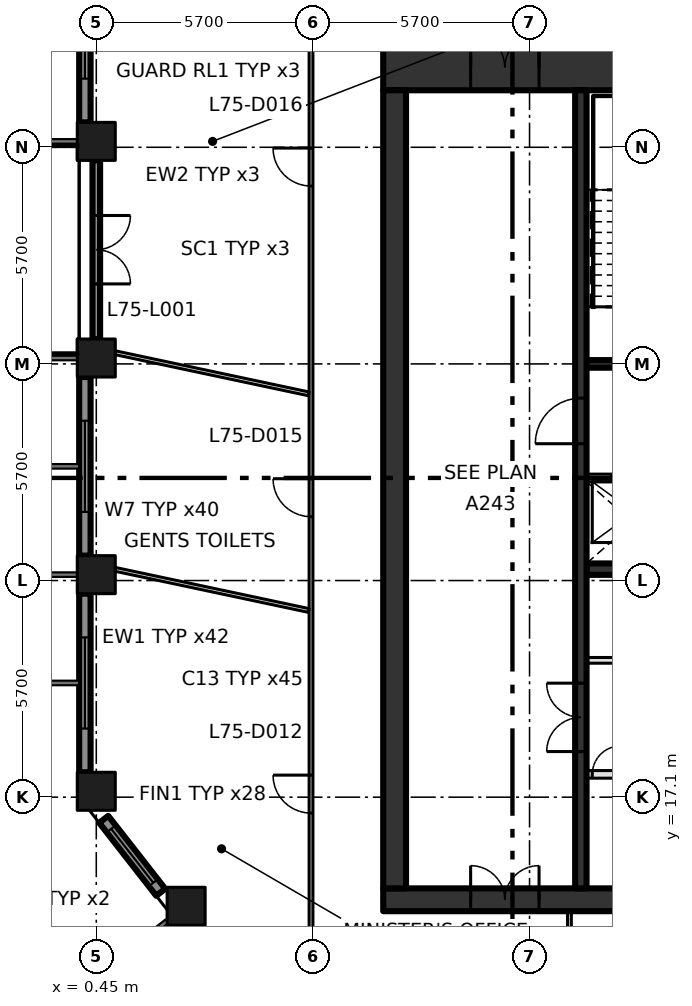
"""IFC4 building model, lengths in metres.
Left out: names, types, materials, properties, quantities, classifications, styles, units other than length and angle.
Written with IfcOpenShell. Run it as: python <this file> out.ifc"""

import sys

from ifc_helpers import new_model, si_unit, direction, frame, frame_2d, origin, origin_2d, place, context, subcontext, project, spatial, rectangle, extrude, element, fill, save


model = new_model("IFC4")
c1 = context("Model", 3, precision=1e-05, world=origin(), true_north=direction((0.0, 1.0)))
c2 = subcontext(c1, "Body", "Model", "MODEL_VIEW")
j1 = project(units=[si_unit("LENGTHUNIT", "METRE"), si_unit("PLANEANGLEUNIT", "RADIAN")], contexts=[c1])
p1 = place(None, origin())
s1 = spatial("IfcSite", under=j1, at=p1, CompositionType="ELEMENT")
p2 = place(p1, origin())
s2 = spatial("IfcBuilding", under=s1, at=p2, CompositionType="ELEMENT")
p3 = place(p2, frame((0.0, 0.0, 327.6)))
s3 = spatial("IfcBuildingStorey", under=s2, at=p3, CompositionType="ELEMENT", Elevation=327.6)
for number, where, z_axis, x_axis in (
    (1, (0.45, 17.255, 0.0), (0.0, 0.0, 1.0), (1.0, 0.0, 0.0)),
    (2, (0.45, 22.955, 0.0), (0.0, 0.0, 1.0), (1.0, 0.0, 0.0)),
    (3, (0.45, 28.655, 0.0), (0.0, 0.0, 1.0), (1.0, 0.0, 0.0)),
    (4, (0.45, 34.355, 0.0), (0.0, 0.0, 1.0), (1.0, 0.0, 0.0)),
    (5, (2.814, 14.229, 0.0), (0.0, 0.0, 1.0), (1.0, 0.0, 0.0)),
):
    element("IfcColumn", number, at=place(p3, frame(where, z_axis=z_axis, x_axis=x_axis)), inside=s3, PredefinedType="COLUMN", context=c2, shape_type="SweptSolid", body=[
        extrude(rectangle(XDim=1.0, YDim=1.0, at=origin_2d()), origin(), (0.0, 0.0, 1.0), 4.2),
    ])
p4 = place(p3, frame((8.0, 14.4, -0.3), z_axis=(0.0, 0.0, 1.0), x_axis=(1.0, 0.0, 0.0)))
e6 = element("IfcWall", 6, at=p4, inside=s3, PredefinedType="SHEAR", context=c2, shape_type="SweptSolid", body=[
    extrude(rectangle(XDim=22.8, YDim=0.6, at=frame_2d((11.4, 0.0))), origin(), (0.0, 0.0, 1.0), 4.2),
])
p5 = place(p4, frame((2.3, 0.0, 0.3)))
e7 = element("IfcOpeningElement", 7, at=p5, cuts=e6, PredefinedType="OPENING", context=c2, shape_type="SweptSolid", body=[
    extrude(rectangle(XDim=1.8, YDim=2.1, at=frame_2d((0.9, 1.05))), frame((0.0, 0.31, 0.0), z_axis=(0.0, -1.0, 0.0), x_axis=(1.0, 0.0, 0.0)), (0.0, 0.0, 1.0), 0.62),
])
p6 = place(p3, frame((8.0, 36.3, -0.3), z_axis=(0.0, 0.0, 1.0), x_axis=(1.0, 0.0, 0.0)))
e8 = element("IfcWall", 8, at=p6, inside=s3, PredefinedType="SHEAR", context=c2, shape_type="SweptSolid", body=[
    extrude(rectangle(XDim=22.8, YDim=1.2, at=frame_2d((11.4, 0.0))), origin(), (0.0, 0.0, 1.0), 4.2),
])
p7 = place(p6, frame((2.3, 0.0, 0.3)))
e9 = element("IfcOpeningElement", 9, at=p7, cuts=e8, PredefinedType="OPENING", context=c2, shape_type="SweptSolid", body=[
    extrude(rectangle(XDim=1.8, YDim=2.1, at=frame_2d((0.9, 1.05))), frame((0.0, 0.61, 0.0), z_axis=(0.0, -1.0, 0.0), x_axis=(1.0, 0.0, 0.0)), (0.0, 0.0, 1.0), 1.22),
])
p8 = place(p3, frame((8.3, 14.7, -0.3), z_axis=(0.0, 0.0, 1.0), x_axis=(0.0, 1.0, 0.0)))
e10 = element("IfcWall", 10, at=p8, inside=s3, PredefinedType="SHEAR", context=c2, shape_type="SweptSolid", body=[
    extrude(rectangle(XDim=21.0, YDim=0.6, at=frame_2d((10.5, 0.0))), origin(), (0.0, 0.0, 1.0), 4.2),
])
p9 = place(p3, frame((13.35, 17.7, 0.0), z_axis=(0.0, 0.0, 1.0), x_axis=(1.0, 0.0, 0.0)))
e11 = element("IfcWall", 11, at=p9, inside=s3, PredefinedType="SOLIDWALL", context=c2, shape_type="SweptSolid", body=[
    extrude(rectangle(XDim=13.425, YDim=0.2, at=frame_2d((6.712, 0.0))), origin(), (0.0, 0.0, 1.0), 3.9),
])
p10 = place(p9, frame((2.0, 0.0, 0.0)))
e12 = element("IfcOpeningElement", 12, at=p10, cuts=e11, PredefinedType="OPENING", context=c2, shape_type="SweptSolid", body=[
    extrude(rectangle(XDim=1.1, YDim=2.1, at=frame_2d((0.55, 1.05))), frame((0.0, 0.11, 0.0), z_axis=(0.0, -1.0, 0.0), x_axis=(1.0, 0.0, 0.0)), (0.0, 0.0, 1.0), 0.22),
])
p11 = place(p9, frame((4.7, 0.0, 0.0)))
e13 = element("IfcOpeningElement", 13, at=p11, cuts=e11, PredefinedType="OPENING", context=c2, shape_type="SweptSolid", body=[
    extrude(rectangle(XDim=1.1, YDim=2.1, at=frame_2d((0.55, 1.05))), frame((0.0, 0.11, 0.0), z_axis=(0.0, -1.0, 0.0), x_axis=(1.0, 0.0, 0.0)), (0.0, 0.0, 1.0), 0.22),
])
p12 = place(p9, frame((7.4, 0.0, 0.0)))
e14 = element("IfcOpeningElement", 14, at=p12, cuts=e11, PredefinedType="OPENING", context=c2, shape_type="SweptSolid", body=[
    extrude(rectangle(XDim=1.1, YDim=2.1, at=frame_2d((0.55, 1.05))), frame((0.0, 0.11, 0.0), z_axis=(0.0, -1.0, 0.0), x_axis=(1.0, 0.0, 0.0)), (0.0, 0.0, 1.0), 0.22),
])
p13 = place(p9, frame((10.1, 0.0, 0.0)))
e15 = element("IfcOpeningElement", 15, at=p13, cuts=e11, PredefinedType="OPENING", context=c2, shape_type="SweptSolid", body=[
    extrude(rectangle(XDim=1.1, YDim=2.1, at=frame_2d((0.55, 1.05))), frame((0.0, 0.11, 0.0), z_axis=(0.0, -1.0, 0.0), x_axis=(1.0, 0.0, 0.0)), (0.0, 0.0, 1.0), 0.22),
])
p14 = place(p9, frame((0.15, 0.0, 0.0)))
e16 = element("IfcOpeningElement", 16, at=p14, cuts=e11, PredefinedType="OPENING", context=c2, shape_type="SweptSolid", body=[
    extrude(rectangle(XDim=0.75, YDim=2.1, at=frame_2d((0.375, 1.05))), frame((0.0, 0.11, 0.0), z_axis=(0.0, -1.0, 0.0), x_axis=(1.0, 0.0, 0.0)), (0.0, 0.0, 1.0), 0.22),
])
p15 = place(p9, frame((12.3, 0.0, 0.0)))
e17 = element("IfcOpeningElement", 17, at=p15, cuts=e11, PredefinedType="OPENING", context=c2, shape_type="SweptSolid", body=[
    extrude(rectangle(XDim=0.75, YDim=2.1, at=frame_2d((0.375, 1.05))), frame((0.0, 0.11, 0.0), z_axis=(0.0, -1.0, 0.0), x_axis=(1.0, 0.0, 0.0)), (0.0, 0.0, 1.0), 0.22),
])
p16 = place(p3, frame((13.35, 20.7, 0.0), z_axis=(0.0, 0.0, 1.0), x_axis=(1.0, 0.0, 0.0)))
e18 = element("IfcWall", 18, at=p16, inside=s3, PredefinedType="PARTITIONING", context=c2, shape_type="SweptSolid", body=[
    extrude(rectangle(XDim=13.425, YDim=0.15, at=frame_2d((6.712, 0.0))), origin(), (0.0, 0.0, 1.0), 3.9),
])
p17 = place(p16, frame((6.15, 0.0, 0.0)))
e19 = element("IfcOpeningElement", 19, at=p17, cuts=e18, PredefinedType="OPENING", context=c2, shape_type="SweptSolid", body=[
    extrude(rectangle(XDim=0.9, YDim=2.1, at=frame_2d((0.45, 1.05))), frame((0.0, 0.085, 0.0), z_axis=(0.0, -1.0, 0.0), x_axis=(1.0, 0.0, 0.0)), (0.0, 0.0, 1.0), 0.17),
])
p18 = place(p3, frame((13.35, 23.1, 0.0), z_axis=(0.0, 0.0, 1.0), x_axis=(1.0, 0.0, 0.0)))
e20 = element("IfcWall", 20, at=p18, inside=s3, PredefinedType="SHEAR", context=c2, shape_type="SweptSolid", body=[
    extrude(rectangle(XDim=16.85, YDim=0.3, at=frame_2d((8.425, 0.0))), origin(), (0.0, 0.0, 1.0), 3.9),
])
p19 = place(p3, frame((13.35, 25.5, 0.0), z_axis=(0.0, 0.0, 1.0), x_axis=(1.0, 0.0, 0.0)))
e21 = element("IfcWall", 21, at=p19, inside=s3, PredefinedType="SOLIDWALL", context=c2, shape_type="SweptSolid", body=[
    extrude(rectangle(XDim=16.85, YDim=0.2, at=frame_2d((8.425, 0.0))), origin(), (0.0, 0.0, 1.0), 3.9),
])
p20 = place(p19, frame((0.65, 0.0, 0.0)))
e22 = element("IfcOpeningElement", 22, at=p20, cuts=e21, PredefinedType="OPENING", context=c2, shape_type="SweptSolid", body=[
    extrude(rectangle(XDim=1.1, YDim=2.1, at=frame_2d((0.55, 1.05))), frame((0.0, 0.11, 0.0), z_axis=(0.0, -1.0, 0.0), x_axis=(1.0, 0.0, 0.0)), (0.0, 0.0, 1.0), 0.22),
])
p21 = place(p19, frame((3.35, 0.0, 0.0)))
e23 = element("IfcOpeningElement", 23, at=p21, cuts=e21, PredefinedType="OPENING", context=c2, shape_type="SweptSolid", body=[
    extrude(rectangle(XDim=1.1, YDim=2.1, at=frame_2d((0.55, 1.05))), frame((0.0, 0.11, 0.0), z_axis=(0.0, -1.0, 0.0), x_axis=(1.0, 0.0, 0.0)), (0.0, 0.0, 1.0), 0.22),
])
p22 = place(p19, frame((6.05, 0.0, 0.0)))
e24 = element("IfcOpeningElement", 24, at=p22, cuts=e21, PredefinedType="OPENING", context=c2, shape_type="SweptSolid", body=[
    extrude(rectangle(XDim=1.1, YDim=2.1, at=frame_2d((0.55, 1.05))), frame((0.0, 0.11, 0.0), z_axis=(0.0, -1.0, 0.0), x_axis=(1.0, 0.0, 0.0)), (0.0, 0.0, 1.0), 0.22),
])
p23 = place(p19, frame((8.75, 0.0, 0.0)))
e25 = element("IfcOpeningElement", 25, at=p23, cuts=e21, PredefinedType="OPENING", context=c2, shape_type="SweptSolid", body=[
    extrude(rectangle(XDim=1.1, YDim=2.1, at=frame_2d((0.55, 1.05))), frame((0.0, 0.11, 0.0), z_axis=(0.0, -1.0, 0.0), x_axis=(1.0, 0.0, 0.0)), (0.0, 0.0, 1.0), 0.22),
])
p24 = place(p19, frame((13.0, 0.0, 0.0)))
e26 = element("IfcOpeningElement", 26, at=p24, cuts=e21, PredefinedType="OPENING", context=c2, shape_type="SweptSolid", body=[
    extrude(rectangle(XDim=0.9, YDim=2.1, at=frame_2d((0.45, 1.05))), frame((0.0, 0.11, 0.0), z_axis=(0.0, -1.0, 0.0), x_axis=(1.0, 0.0, 0.0)), (0.0, 0.0, 1.0), 0.22),
])
p25 = place(p3, frame((13.35, 28.5, 0.0), z_axis=(0.0, 0.0, 1.0), x_axis=(1.0, 0.0, 0.0)))
e27 = element("IfcWall", 27, at=p25, inside=s3, PredefinedType="SOLIDWALL", context=c2, shape_type="SweptSolid", body=[
    extrude(rectangle(XDim=6.75, YDim=0.2, at=frame_2d((3.375, 0.0))), origin(), (0.0, 0.0, 1.0), 3.9),
])
p26 = place(p25, frame((0.95, 0.0, 0.0)))
e28 = element("IfcOpeningElement", 28, at=p26, cuts=e27, PredefinedType="OPENING", context=c2, shape_type="SweptSolid", body=[
    extrude(rectangle(XDim=1.2, YDim=2.1, at=frame_2d((0.6, 1.05))), frame((0.0, 0.11, 0.0), z_axis=(0.0, -1.0, 0.0), x_axis=(1.0, 0.0, 0.0)), (0.0, 0.0, 1.0), 0.22),
])
p27 = place(p25, frame((3.75, 0.0, 0.0)))
e29 = element("IfcOpeningElement", 29, at=p27, cuts=e27, PredefinedType="OPENING", context=c2, shape_type="SweptSolid", body=[
    extrude(rectangle(XDim=1.1, YDim=2.1, at=frame_2d((0.55, 1.05))), frame((0.0, 0.11, 0.0), z_axis=(0.0, -1.0, 0.0), x_axis=(1.0, 0.0, 0.0)), (0.0, 0.0, 1.0), 0.22),
])
p28 = place(p3, frame((13.2, 14.7, 0.0), z_axis=(0.0, 0.0, 1.0), x_axis=(0.0, 1.0, 0.0)))
e30 = element("IfcWall", 30, at=p28, inside=s3, PredefinedType="SHEAR", context=c2, shape_type="SweptSolid", body=[
    extrude(rectangle(XDim=21.0, YDim=0.3, at=frame_2d((10.5, 0.0))), origin(), (0.0, 0.0, 1.0), 3.9),
])
p29 = place(p28, frame((3.6, 0.0, 0.0)))
e31 = element("IfcOpeningElement", 31, at=p29, cuts=e30, PredefinedType="OPENING", context=c2, shape_type="SweptSolid", body=[
    extrude(rectangle(XDim=1.8, YDim=2.1, at=frame_2d((0.9, 1.05))), frame((0.0, 0.16, 0.0), z_axis=(0.0, -1.0, 0.0), x_axis=(1.0, 0.0, 0.0)), (0.0, 0.0, 1.0), 0.32),
])
p30 = place(p28, frame((11.7, 0.0, 0.0)))
e32 = element("IfcOpeningElement", 32, at=p30, cuts=e30, PredefinedType="OPENING", context=c2, shape_type="SweptSolid", body=[
    extrude(rectangle(XDim=1.2, YDim=2.1, at=frame_2d((0.6, 1.05))), frame((0.0, 0.16, 0.0), z_axis=(0.0, -1.0, 0.0), x_axis=(1.0, 0.0, 0.0)), (0.0, 0.0, 1.0), 0.32),
])
p31 = place(p3, frame((0.15, 39.555, 0.0), z_axis=(0.0, 0.0, 1.0), x_axis=(0.0, -1.0, 0.0)))
e33 = element("IfcWall", 33, at=p31, inside=s3, PredefinedType="SOLIDWALL", context=c2, shape_type="SweptSolid", body=[
    extrude(rectangle(XDim=4.7, YDim=0.3, at=frame_2d((2.35, 0.0))), origin(), (0.0, 0.0, 1.0), 3.2),
])
p32 = place(p31, frame((1.15, 0.0, 0.8)))
e34 = element("IfcOpeningElement", 34, at=p32, cuts=e33, PredefinedType="OPENING", context=c2, shape_type="SweptSolid", body=[
    extrude(rectangle(XDim=2.4, YDim=2.1, at=frame_2d((1.2, 1.05))), frame((0.0, 0.16, 0.0), z_axis=(0.0, -1.0, 0.0), x_axis=(1.0, 0.0, 0.0)), (0.0, 0.0, 1.0), 0.32),
])
p33 = place(p3, frame((0.45, 33.855, 0.0), z_axis=(0.0, 0.0, 1.0), x_axis=(0.0, -1.0, 0.0)))
e35 = element("IfcWall", 35, at=p33, inside=s3, PredefinedType="SOLIDWALL", context=c2, shape_type="SweptSolid", body=[
    extrude(rectangle(XDim=4.7, YDim=0.2, at=frame_2d((2.35, 0.0))), origin(), (0.0, 0.0, 1.0), 3.2),
])
p34 = place(p33, frame((1.45, 0.0, 0.0)))
e36 = element("IfcOpeningElement", 36, at=p34, cuts=e35, PredefinedType="OPENING", context=c2, shape_type="SweptSolid", body=[
    extrude(rectangle(XDim=1.8, YDim=2.9, at=frame_2d((0.9, 1.45))), frame((0.0, 0.11, 0.0), z_axis=(0.0, -1.0, 0.0), x_axis=(1.0, 0.0, 0.0)), (0.0, 0.0, 1.0), 0.22),
])
p35 = place(p3, frame((-0.88, 34.185, 0.0), z_axis=(0.0, 0.0, 1.0), x_axis=(0.0, -1.0, 0.0)))
e37 = element("IfcWall", 37, at=p35, inside=s3, PredefinedType="SOLIDWALL", context=c2, shape_type="SweptSolid", body=[
    extrude(rectangle(XDim=5.36, YDim=0.4, at=frame_2d((2.68, 0.0))), origin(), (0.0, 0.0, 1.0), 0.3),
])
p36 = place(p3, frame((0.15, 28.155, 0.0), z_axis=(0.0, 0.0, 1.0), x_axis=(0.0, -1.0, 0.0)))
e38 = element("IfcWall", 38, at=p36, inside=s3, PredefinedType="SOLIDWALL", context=c2, shape_type="SweptSolid", body=[
    extrude(rectangle(XDim=4.7, YDim=0.3, at=frame_2d((2.35, 0.0))), origin(), (0.0, 0.0, 1.0), 3.2),
])
p37 = place(p36, frame((1.15, 0.0, 0.8)))
e39 = element("IfcOpeningElement", 39, at=p37, cuts=e38, PredefinedType="OPENING", context=c2, shape_type="SweptSolid", body=[
    extrude(rectangle(XDim=2.4, YDim=2.1, at=frame_2d((1.2, 1.05))), frame((0.0, 0.16, 0.0), z_axis=(0.0, -1.0, 0.0), x_axis=(1.0, 0.0, 0.0)), (0.0, 0.0, 1.0), 0.32),
])
p38 = place(p3, frame((0.15, 22.455, 0.0), z_axis=(0.0, 0.0, 1.0), x_axis=(0.0, -1.0, 0.0)))
e40 = element("IfcWall", 40, at=p38, inside=s3, PredefinedType="SOLIDWALL", context=c2, shape_type="SweptSolid", body=[
    extrude(rectangle(XDim=4.7, YDim=0.3, at=frame_2d((2.35, 0.0))), origin(), (0.0, 0.0, 1.0), 3.2),
])
p39 = place(p38, frame((1.15, 0.0, 0.8)))
e41 = element("IfcOpeningElement", 41, at=p39, cuts=e40, PredefinedType="OPENING", context=c2, shape_type="SweptSolid", body=[
    extrude(rectangle(XDim=2.4, YDim=2.1, at=frame_2d((1.2, 1.05))), frame((0.0, 0.16, 0.0), z_axis=(0.0, -1.0, 0.0), x_axis=(1.0, 0.0, 0.0)), (0.0, 0.0, 1.0), 0.32),
])
p40 = place(p3, frame((0.646, 16.517, 0.0), z_axis=(0.0, 0.0, 1.0), x_axis=(0.615610986717, -0.788050197026, 0.0)))
e42 = element("IfcWall", 42, at=p40, inside=s3, PredefinedType="SOLIDWALL", context=c2, shape_type="SweptSolid", body=[
    extrude(rectangle(XDim=2.437, YDim=0.3, at=frame_2d((1.218, 0.0))), origin(), (0.0, 0.0, 1.0), 3.2),
])
p41 = place(p40, frame((0.318, 0.0, 0.8)))
e43 = element("IfcOpeningElement", 43, at=p41, cuts=e42, PredefinedType="OPENING", context=c2, shape_type="SweptSolid", body=[
    extrude(rectangle(XDim=1.8, YDim=2.1, at=frame_2d((0.9, 1.05))), frame((0.0, 0.16, 0.0), z_axis=(0.0, -1.0, 0.0), x_axis=(1.0, 0.0, 0.0)), (0.0, 0.0, 1.0), 0.32),
])
p42 = place(p3, frame((6.1, 12.2, 0.0), z_axis=(0.0, 0.0, 1.0), x_axis=(0.0, 1.0, 0.0)))
e44 = element("IfcWall", 44, at=p42, inside=s3, PredefinedType="PARTITIONING", context=c2, shape_type="SweptSolid", body=[
    extrude(rectangle(XDim=26.7, YDim=0.1, at=frame_2d((13.35, 0.0))), origin(), (0.0, 0.0, 1.0), 3.9),
])
p43 = place(p42, frame((4.48, 0.0, 0.0)))
e45 = element("IfcOpeningElement", 45, at=p43, cuts=e44, PredefinedType="OPENING", context=c2, shape_type="SweptSolid", body=[
    extrude(rectangle(XDim=1.0, YDim=2.1, at=frame_2d((0.5, 1.05))), frame((0.0, 0.06, 0.0), z_axis=(0.0, -1.0, 0.0), x_axis=(1.0, 0.0, 0.0)), (0.0, 0.0, 1.0), 0.12),
])
p44 = place(p42, frame((12.279, 0.0, 0.0)))
e46 = element("IfcOpeningElement", 46, at=p44, cuts=e44, PredefinedType="OPENING", context=c2, shape_type="SweptSolid", body=[
    extrude(rectangle(XDim=1.0, YDim=2.1, at=frame_2d((0.5, 1.05))), frame((0.0, 0.06, 0.0), z_axis=(0.0, -1.0, 0.0), x_axis=(1.0, 0.0, 0.0)), (0.0, 0.0, 1.0), 0.12),
])
p45 = place(p42, frame((20.979, 0.0, 0.0)))
e47 = element("IfcOpeningElement", 47, at=p45, cuts=e44, PredefinedType="OPENING", context=c2, shape_type="SweptSolid", body=[
    extrude(rectangle(XDim=1.0, YDim=2.1, at=frame_2d((0.5, 1.05))), frame((0.0, 0.06, 0.0), z_axis=(0.0, -1.0, 0.0), x_axis=(1.0, 0.0, 0.0)), (0.0, 0.0, 1.0), 0.12),
])
p46 = place(p3, frame((12.9, 10.078, 0.0), z_axis=(0.0, 0.0, 1.0), x_axis=(0.0, 1.0, 0.0)))
e48 = element("IfcWall", 48, at=p46, inside=s3, PredefinedType="PARTITIONING", context=c2, shape_type="SweptSolid", body=[
    extrude(rectangle(XDim=4.022, YDim=0.1, at=frame_2d((2.011, 0.0))), origin(), (0.0, 0.0, 1.0), 3.9),
])
p47 = place(p46, frame((1.58, 0.0, 0.0)))
e49 = element("IfcOpeningElement", 49, at=p47, cuts=e48, PredefinedType="OPENING", context=c2, shape_type="SweptSolid", body=[
    extrude(rectangle(XDim=1.0, YDim=2.1, at=frame_2d((0.5, 1.05))), frame((0.0, 0.06, 0.0), z_axis=(0.0, -1.0, 0.0), x_axis=(1.0, 0.0, 0.0)), (0.0, 0.0, 1.0), 0.12),
])
for number, where, z_axis, x_axis in (
    (50, (6.04, 22.012, 0.0), (0.0, 0.0, 1.0), (-0.978, 0.208, 0.0)),
    (51, (6.04, 27.712, 0.0), (0.0, 0.0, 1.0), (-0.978, 0.208, 0.0)),
):
    element("IfcWall", number, at=place(p3, frame(where, z_axis=z_axis, x_axis=x_axis)), inside=s3, PredefinedType="PARTITIONING", context=c2, shape_type="SweptSolid", body=[
        extrude(rectangle(XDim=5.204, YDim=0.1, at=frame_2d((2.602, 0.0))), origin(), (0.0, 0.0, 1.0), 3.9),
    ])
p48 = place(p20, origin())
e52 = element("IfcDoor", 52, at=p48, inside=s3, OperationType="SLIDING_TO_LEFT", PredefinedType="DOOR", context=c2, shape_type="SweptSolid", body=[
    extrude(rectangle(XDim=1.1, YDim=2.1, at=frame_2d((0.55, 1.05))), frame((0.0, 0.025, 0.0), z_axis=(0.0, -1.0, 0.0), x_axis=(1.0, 0.0, 0.0)), (0.0, 0.0, 1.0), 0.05),
])
fill(e22, e52)
p49 = place(p14, origin())
e53 = element("IfcDoor", 53, at=p49, inside=s3, OperationType="SINGLE_SWING_RIGHT", PredefinedType="DOOR", context=c2, shape_type="SweptSolid", body=[
    extrude(rectangle(XDim=0.75, YDim=2.1, at=frame_2d((0.375, 1.05))), frame((0.0, 0.025, 0.0), z_axis=(0.0, -1.0, 0.0), x_axis=(1.0, 0.0, 0.0)), (0.0, 0.0, 1.0), 0.05),
])
fill(e16, e53)
p50 = place(p29, origin())
e54 = element("IfcDoor", 54, at=p50, inside=s3, OperationType="DOUBLE_DOOR_SINGLE_SWING", PredefinedType="DOOR", context=c2, shape_type="SweptSolid", body=[
    extrude(rectangle(XDim=1.8, YDim=2.1, at=frame_2d((0.9, 1.05))), frame((0.0, 0.025, 0.0), z_axis=(0.0, -1.0, 0.0), x_axis=(1.0, 0.0, 0.0)), (0.0, 0.0, 1.0), 0.05),
])
fill(e31, e54)
p51 = place(p30, origin())
e55 = element("IfcDoor", 55, at=p51, inside=s3, OperationType="SINGLE_SWING_LEFT", PredefinedType="DOOR", context=c2, shape_type="SweptSolid", body=[
    extrude(rectangle(XDim=1.2, YDim=2.1, at=frame_2d((0.6, 1.05))), frame((0.0, 0.025, 0.0), z_axis=(0.0, -1.0, 0.0), x_axis=(1.0, 0.0, 0.0)), (0.0, 0.0, 1.0), 0.05),
])
fill(e32, e55)
p52 = place(p7, origin())
e56 = element("IfcDoor", 56, at=p52, inside=s3, OperationType="DOUBLE_DOOR_SINGLE_SWING", PredefinedType="DOOR", context=c2, shape_type="SweptSolid", body=[
    extrude(rectangle(XDim=1.8, YDim=2.1, at=frame_2d((0.9, 1.05))), frame((0.0, 0.025, 0.0), z_axis=(0.0, -1.0, 0.0), x_axis=(1.0, 0.0, 0.0)), (0.0, 0.0, 1.0), 0.05),
])
fill(e9, e56)
p53 = place(p5, origin())
e57 = element("IfcDoor", 57, at=p53, inside=s3, OperationType="DOUBLE_DOOR_SINGLE_SWING", PredefinedType="DOOR", context=c2, shape_type="SweptSolid", body=[
    extrude(rectangle(XDim=1.8, YDim=2.1, at=frame_2d((0.9, 1.05))), frame((0.0, 0.025, 0.0), z_axis=(0.0, -1.0, 0.0), x_axis=(1.0, 0.0, 0.0)), (0.0, 0.0, 1.0), 0.05),
])
fill(e7, e57)
p54 = place(p32, origin())
e58 = element("IfcWindow", 58, at=p54, inside=s3, PartitioningType="DOUBLE_PANEL_VERTICAL", PredefinedType="WINDOW", context=c2, shape_type="SweptSolid", body=[
    extrude(rectangle(XDim=2.4, YDim=2.1, at=frame_2d((1.2, 1.05))), frame((0.0, 0.03, 0.0), z_axis=(0.0, -1.0, 0.0), x_axis=(1.0, 0.0, 0.0)), (0.0, 0.0, 1.0), 0.06),
])
fill(e34, e58)
p55 = place(p34, origin())
e59 = element("IfcDoor", 59, at=p55, inside=s3, OperationType="DOUBLE_DOOR_SINGLE_SWING", PredefinedType="DOOR", context=c2, shape_type="SweptSolid", body=[
    extrude(rectangle(XDim=1.8, YDim=2.9, at=frame_2d((0.9, 1.45))), frame((0.0, 0.025, 0.0), z_axis=(0.0, -1.0, 0.0), x_axis=(1.0, 0.0, 0.0)), (0.0, 0.0, 1.0), 0.05),
])
fill(e36, e59)
p56 = place(p37, origin())
e60 = element("IfcWindow", 60, at=p56, inside=s3, PartitioningType="DOUBLE_PANEL_VERTICAL", PredefinedType="WINDOW", context=c2, shape_type="SweptSolid", body=[
    extrude(rectangle(XDim=2.4, YDim=2.1, at=frame_2d((1.2, 1.05))), frame((0.0, 0.03, 0.0), z_axis=(0.0, -1.0, 0.0), x_axis=(1.0, 0.0, 0.0)), (0.0, 0.0, 1.0), 0.06),
])
fill(e39, e60)
p57 = place(p39, origin())
e61 = element("IfcWindow", 61, at=p57, inside=s3, PartitioningType="DOUBLE_PANEL_VERTICAL", PredefinedType="WINDOW", context=c2, shape_type="SweptSolid", body=[
    extrude(rectangle(XDim=2.4, YDim=2.1, at=frame_2d((1.2, 1.05))), frame((0.0, 0.03, 0.0), z_axis=(0.0, -1.0, 0.0), x_axis=(1.0, 0.0, 0.0)), (0.0, 0.0, 1.0), 0.06),
])
fill(e41, e61)
p58 = place(p41, origin())
e62 = element("IfcWindow", 62, at=p58, inside=s3, PartitioningType="DOUBLE_PANEL_VERTICAL", PredefinedType="WINDOW", context=c2, shape_type="SweptSolid", body=[
    extrude(rectangle(XDim=1.8, YDim=2.1, at=frame_2d((0.9, 1.05))), frame((0.0, 0.03, 0.0), z_axis=(0.0, -1.0, 0.0), x_axis=(1.0, 0.0, 0.0)), (0.0, 0.0, 1.0), 0.06),
])
fill(e43, e62)
p59 = place(p43, origin())
e63 = element("IfcDoor", 63, at=p59, inside=s3, OperationType="SINGLE_SWING_RIGHT", PredefinedType="DOOR", context=c2, shape_type="SweptSolid", body=[
    extrude(rectangle(XDim=1.0, YDim=2.1, at=frame_2d((0.5, 1.05))), frame((0.0, 0.025, 0.0), z_axis=(0.0, -1.0, 0.0), x_axis=(1.0, 0.0, 0.0)), (0.0, 0.0, 1.0), 0.05),
])
fill(e45, e63)
p60 = place(p44, origin())
e64 = element("IfcDoor", 64, at=p60, inside=s3, OperationType="SINGLE_SWING_RIGHT", PredefinedType="DOOR", context=c2, shape_type="SweptSolid", body=[
    extrude(rectangle(XDim=1.0, YDim=2.1, at=frame_2d((0.5, 1.05))), frame((0.0, 0.025, 0.0), z_axis=(0.0, -1.0, 0.0), x_axis=(1.0, 0.0, 0.0)), (0.0, 0.0, 1.0), 0.05),
])
fill(e46, e64)
p61 = place(p45, origin())
e65 = element("IfcDoor", 65, at=p61, inside=s3, OperationType="SINGLE_SWING_RIGHT", PredefinedType="DOOR", context=c2, shape_type="SweptSolid", body=[
    extrude(rectangle(XDim=1.0, YDim=2.1, at=frame_2d((0.5, 1.05))), frame((0.0, 0.025, 0.0), z_axis=(0.0, -1.0, 0.0), x_axis=(1.0, 0.0, 0.0)), (0.0, 0.0, 1.0), 0.05),
])
fill(e47, e65)
save(model, sys.argv[1])
